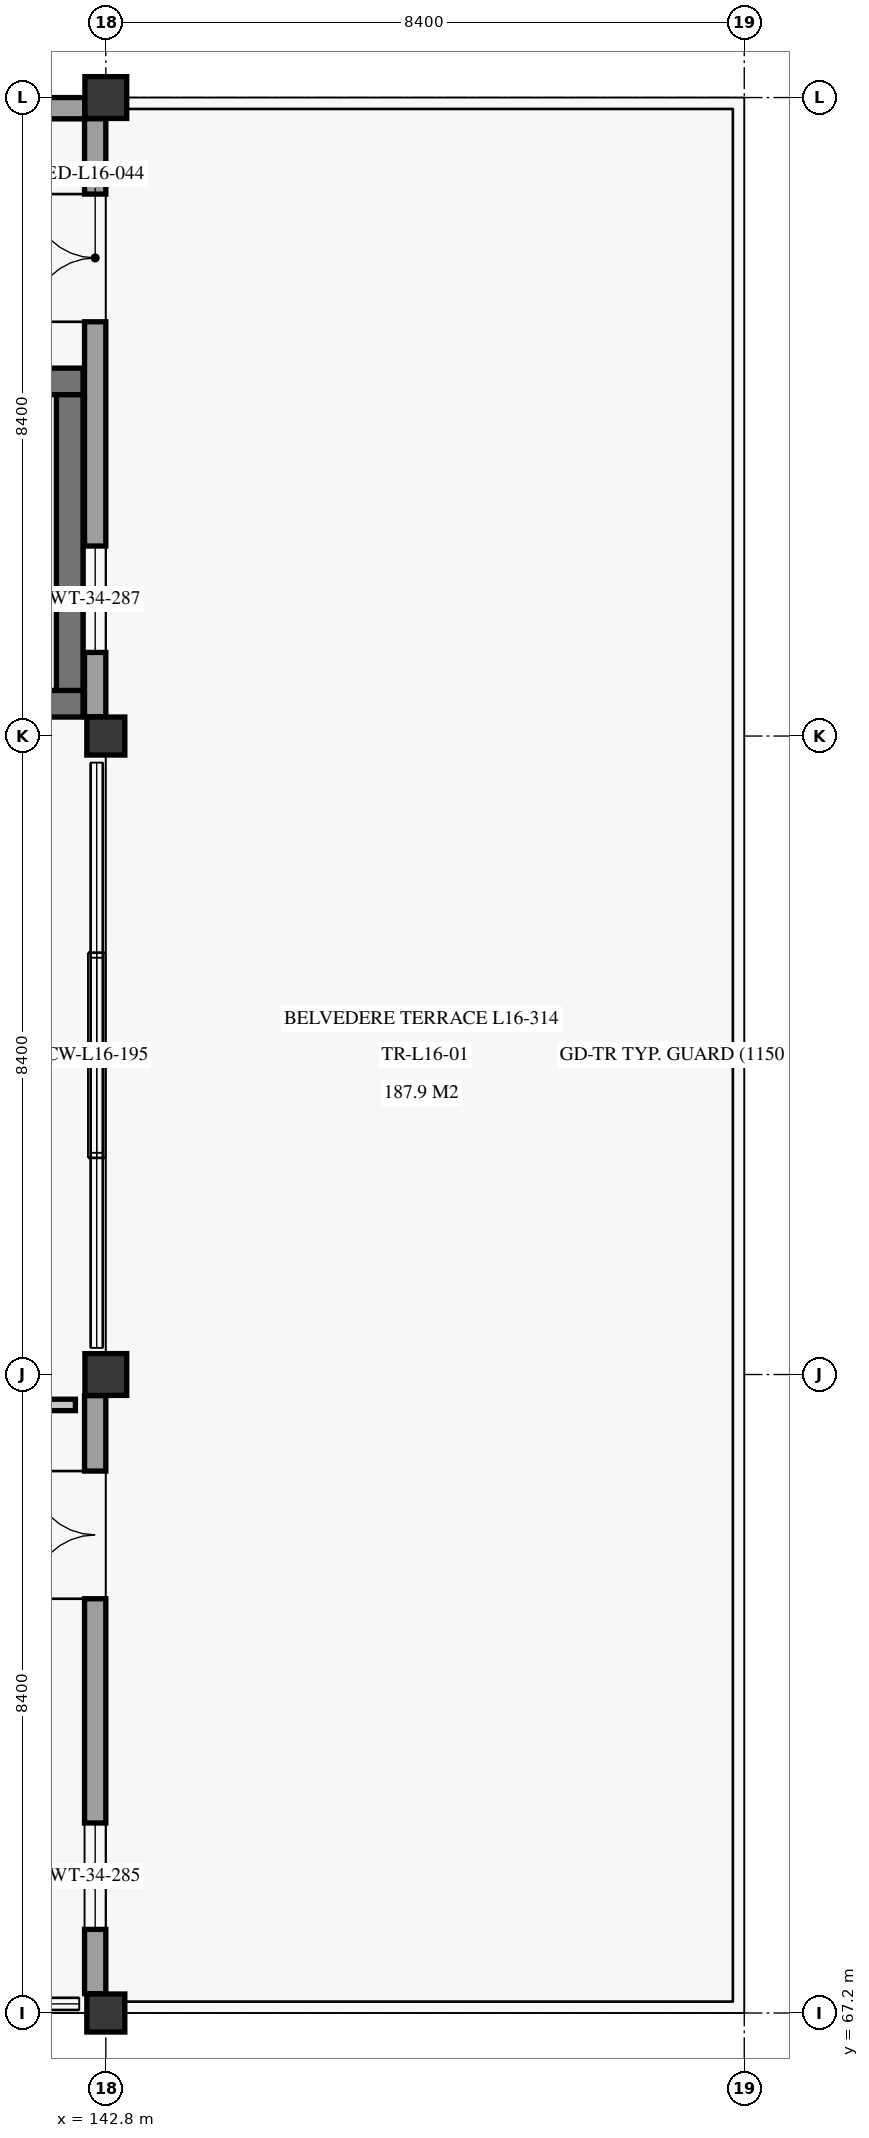
"""IFC4 building model, lengths in metres.
Left out: names, types, materials, properties, quantities, classifications, styles, units other than length and angle.
Written with IfcOpenShell. Run it as: python <this file> out.ifc"""

import sys

from ifc_helpers import new_model, si_unit, direction, frame, frame_2d, origin, origin_2d, place, context, subcontext, project, spatial, polyline, rectangle, outline, extrude, element, fill, save


model = new_model("IFC4")
c1 = context("Model", 3, precision=1e-05, world=origin(), true_north=direction((0.0, 1.0)))
c2 = subcontext(c1, "Body", "Model", "MODEL_VIEW")
j1 = project(units=[si_unit("LENGTHUNIT", "METRE"), si_unit("PLANEANGLEUNIT", "RADIAN")], contexts=[c1])
p1 = place(None, origin())
s1 = spatial("IfcSite", under=j1, at=p1, CompositionType="ELEMENT")
p2 = place(p1, origin())
s2 = spatial("IfcBuilding", under=s1, at=p2, CompositionType="ELEMENT")
p3 = place(p2, frame((0.0, 0.0, 66.7)))
s3 = spatial("IfcBuildingStorey", under=s2, at=p3, CompositionType="ELEMENT", Elevation=66.7)
p4 = place(p3, frame((142.8, 67.2, 0.0), z_axis=(0.0, 0.0, 1.0), x_axis=(1.0, 0.0, 0.0)))
e1 = element("IfcColumn", 1, at=p4, inside=s3, PredefinedType="COLUMN", context=c2, shape_type="SweptSolid", body=[
    extrude(rectangle(XDim=0.5, YDim=0.5, at=origin_2d()), origin(), (0.0, 0.0, 1.0), 4.22),
])
p5 = place(p3, frame((142.8, 75.6, 0.0), z_axis=(0.0, 0.0, 1.0), x_axis=(1.0, 0.0, 0.0)))
e2 = element("IfcColumn", 2, at=p5, inside=s3, PredefinedType="COLUMN", context=c2, shape_type="SweptSolid", body=[
    extrude(rectangle(XDim=0.55, YDim=0.55, at=origin_2d()), origin(), (0.0, 0.0, 1.0), 4.22),
])
p6 = place(p3, frame((142.8, 84.0, 0.0), z_axis=(0.0, 0.0, 1.0), x_axis=(1.0, 0.0, 0.0)))
e3 = element("IfcColumn", 3, at=p6, inside=s3, PredefinedType="COLUMN", context=c2, shape_type="SweptSolid", body=[
    extrude(rectangle(XDim=0.5, YDim=0.5, at=origin_2d()), origin(), (0.0, 0.0, 1.0), 4.22),
])
p7 = place(p3, frame((142.8, 92.4, 0.0), z_axis=(0.0, 0.0, 1.0), x_axis=(1.0, 0.0, 0.0)))
e4 = element("IfcColumn", 4, at=p7, inside=s3, PredefinedType="COLUMN", context=c2, shape_type="SweptSolid", body=[
    extrude(rectangle(XDim=0.55, YDim=0.55, at=origin_2d()), origin(), (0.0, 0.0, 1.0), 4.22),
])
p8 = place(p3, frame((134.654, 92.26, 0.0), z_axis=(0.0, 0.0, 1.0), x_axis=(1.0, 0.0, 0.0)))
e5 = element("IfcWall", 5, at=p8, inside=s3, PredefinedType="SOLIDWALL", context=c2, shape_type="SweptSolid", body=[
    extrude(rectangle(XDim=7.868, YDim=0.28, at=frame_2d((3.934, 0.0))), origin(), (0.0, 0.0, 1.0), 3.54),
])
p9 = place(p8, frame((2.546, 0.0, 0.85)))
e6 = element("IfcOpeningElement", 6, at=p9, cuts=e5, PredefinedType="OPENING", context=c2, shape_type="SweptSolid", body=[
    extrude(rectangle(XDim=2.8, YDim=1.85, at=frame_2d((1.4, 0.925))), frame((0.0, 0.15, 0.0), z_axis=(0.0, -1.0, 0.0), x_axis=(1.0, 0.0, 0.0)), (0.0, 0.0, 1.0), 0.3),
])
p10 = place(p3, frame((142.66, 67.454, 0.0), z_axis=(0.0, 0.0, 1.0), x_axis=(0.0, 1.0, 0.0)))
e7 = element("IfcWall", 7, at=p10, inside=s3, PredefinedType="SOLIDWALL", context=c2, shape_type="SweptSolid", body=[
    extrude(rectangle(XDim=7.868, YDim=0.28, at=frame_2d((3.934, 0.0))), origin(), (0.0, 0.0, 1.0), 3.54),
])
p11 = place(p10, frame((0.846, 0.0, 0.85)))
e8 = element("IfcOpeningElement", 8, at=p11, cuts=e7, PredefinedType="OPENING", context=c2, shape_type="SweptSolid", body=[
    extrude(rectangle(XDim=1.4, YDim=1.7, at=frame_2d((0.7, 0.85))), frame((0.0, 0.15, 0.0), z_axis=(0.0, -1.0, 0.0), x_axis=(1.0, 0.0, 0.0)), (0.0, 0.0, 1.0), 0.3),
])
p12 = place(p10, frame((5.196, 0.0, 0.0)))
e9 = element("IfcOpeningElement", 9, at=p12, cuts=e7, PredefinedType="OPENING", context=c2, shape_type="SweptSolid", body=[
    extrude(rectangle(XDim=1.68, YDim=2.3, at=frame_2d((0.84, 1.15))), frame((0.0, 0.15, 0.0), z_axis=(0.0, -1.0, 0.0), x_axis=(1.0, 0.0, 0.0)), (0.0, 0.0, 1.0), 0.3),
])
p13 = place(p3, frame((142.66, 84.254, 0.0), z_axis=(0.0, 0.0, 1.0), x_axis=(0.0, 1.0, 0.0)))
e10 = element("IfcWall", 10, at=p13, inside=s3, PredefinedType="SOLIDWALL", context=c2, shape_type="SweptSolid", body=[
    extrude(rectangle(XDim=7.868, YDim=0.28, at=frame_2d((3.934, 0.0))), origin(), (0.0, 0.0, 1.0), 3.54),
])
p14 = place(p13, frame((0.846, 0.0, 0.85)))
e11 = element("IfcOpeningElement", 11, at=p14, cuts=e10, PredefinedType="OPENING", context=c2, shape_type="SweptSolid", body=[
    extrude(rectangle(XDim=1.4, YDim=1.7, at=frame_2d((0.7, 0.85))), frame((0.0, 0.15, 0.0), z_axis=(0.0, -1.0, 0.0), x_axis=(1.0, 0.0, 0.0)), (0.0, 0.0, 1.0), 0.3),
])
p15 = place(p13, frame((5.196, 0.0, 0.0)))
e12 = element("IfcOpeningElement", 12, at=p15, cuts=e10, PredefinedType="OPENING", context=c2, shape_type="SweptSolid", body=[
    extrude(rectangle(XDim=1.68, YDim=2.3, at=frame_2d((0.84, 1.15))), frame((0.0, 0.15, 0.0), z_axis=(0.0, -1.0, 0.0), x_axis=(1.0, 0.0, 0.0)), (0.0, 0.0, 1.0), 0.3),
])
for number, where, z_axis, x_axis in (
    (13, (134.53, 92.28, 4.5), (0.0, 0.0, 1.0), (1.0, 0.0, 0.0)),
    (14, (134.53, 67.32, 4.5), (0.0, 0.0, 1.0), (1.0, 0.0, 0.0)),
):
    element("IfcWall", number, at=place(p3, frame(where, z_axis=z_axis, x_axis=x_axis)), inside=s3, PredefinedType="SOLIDWALL", context=c2, shape_type="SweptSolid", body=[
        extrude(outline(polyline([(0.0, 0.0), (8.104, 0.0), (8.104, 3.0), (4.052, 3.6), (0.0, 4.2), (0.0, 0.0)])), frame((0.0, 0.115, 0.0), z_axis=(0.0, -1.0, 0.0), x_axis=(1.0, 0.0, 0.0)), (0.0, 0.0, 1.0), 0.23),
    ])
p16 = place(p3, frame((142.68, 67.366, 4.5), z_axis=(0.0, 0.0, 1.0), x_axis=(0.0, 1.0, 0.0)))
e15 = element("IfcWall", 15, at=p16, inside=s3, PredefinedType="SOLIDWALL", context=c2, shape_type="SweptSolid", body=[
    extrude(rectangle(XDim=8.104, YDim=0.23, at=frame_2d((4.052, 0.0))), origin(), (0.0, 0.0, 1.0), 3.15),
])
p17 = place(p3, frame((142.68, 75.73, 4.5), z_axis=(0.0, 0.0, 1.0), x_axis=(0.0, 1.0, 0.0)))
e16 = element("IfcWall", 16, at=p17, inside=s3, PredefinedType="SOLIDWALL", context=c2, shape_type="SweptSolid", body=[
    extrude(rectangle(XDim=8.14, YDim=0.23, at=frame_2d((4.07, 0.0))), origin(), (0.0, 0.0, 1.0), 3.15),
])
p18 = place(p17, frame((2.72, 0.0, 0.5)))
e17 = element("IfcOpeningElement", 17, at=p18, cuts=e16, PredefinedType="OPENING", context=c2, shape_type="SweptSolid", body=[
    extrude(rectangle(XDim=2.7, YDim=2.2, at=frame_2d((1.35, 1.1))), frame((0.0, 0.125, 0.0), z_axis=(0.0, -1.0, 0.0), x_axis=(1.0, 0.0, 0.0)), (0.0, 0.0, 1.0), 0.25),
])
p19 = place(p3, frame((142.68, 84.13, 4.5), z_axis=(0.0, 0.0, 1.0), x_axis=(0.0, 1.0, 0.0)))
e18 = element("IfcWall", 18, at=p19, inside=s3, PredefinedType="SOLIDWALL", context=c2, shape_type="SweptSolid", body=[
    extrude(rectangle(XDim=8.104, YDim=0.23, at=frame_2d((4.052, 0.0))), origin(), (0.0, 0.0, 1.0), 3.15),
])
p20 = place(p3, frame((132.75, 84.425, 0.0), z_axis=(0.0, 0.0, 1.0), x_axis=(1.0, 0.0, 0.0)))
e19 = element("IfcWall", 19, at=p20, inside=s3, PredefinedType="SHEAR", context=c2, shape_type="SweptSolid", body=[
    extrude(rectangle(XDim=9.75, YDim=0.35, at=frame_2d((4.875, 0.0))), origin(), (0.0, 0.0, 1.0), 4.22),
])
p21 = place(p3, frame((132.75, 88.665, 0.0), z_axis=(0.0, 0.0, 1.0), x_axis=(1.0, 0.0, 0.0)))
e20 = element("IfcWall", 20, at=p21, inside=s3, PredefinedType="SHEAR", context=c2, shape_type="SweptSolid", body=[
    extrude(rectangle(XDim=9.75, YDim=0.35, at=frame_2d((4.875, 0.0))), origin(), (0.0, 0.0, 1.0), 4.22),
])
p22 = place(p21, frame((0.72, 0.0, 0.0)))
e21 = element("IfcOpeningElement", 21, at=p22, cuts=e20, PredefinedType="OPENING", context=c2, shape_type="SweptSolid", body=[
    extrude(rectangle(XDim=1.25, YDim=2.2, at=frame_2d((0.625, 1.1))), frame((0.0, 0.185, 0.0), z_axis=(0.0, -1.0, 0.0), x_axis=(1.0, 0.0, 0.0)), (0.0, 0.0, 1.0), 0.37),
])
p23 = place(p3, frame((142.325, 84.6, 0.0), z_axis=(0.0, 0.0, 1.0), x_axis=(0.0, 1.0, 0.0)))
e22 = element("IfcWall", 22, at=p23, inside=s3, PredefinedType="SHEAR", context=c2, shape_type="SweptSolid", body=[
    extrude(rectangle(XDim=3.89, YDim=0.35, at=frame_2d((1.945, 0.0))), origin(), (0.0, 0.0, 1.0), 4.22),
])
p24 = place(p3, frame((132.75, 84.425, 4.5), z_axis=(0.0, 0.0, 1.0), x_axis=(1.0, 0.0, 0.0)))
e23 = element("IfcWall", 23, at=p24, inside=s3, PredefinedType="SHEAR", context=c2, shape_type="SweptSolid", body=[
    extrude(rectangle(XDim=9.75, YDim=0.35, at=frame_2d((4.875, 0.0))), origin(), (0.0, 0.0, 1.0), 3.58),
])
p25 = place(p3, frame((132.75, 88.665, 4.5), z_axis=(0.0, 0.0, 1.0), x_axis=(1.0, 0.0, 0.0)))
e24 = element("IfcWall", 24, at=p25, inside=s3, PredefinedType="SHEAR", context=c2, shape_type="SweptSolid", body=[
    extrude(rectangle(XDim=9.75, YDim=0.35, at=frame_2d((4.875, 0.0))), origin(), (0.0, 0.0, 1.0), 3.58),
])
p26 = place(p25, frame((0.72, 0.0, 0.0)))
e25 = element("IfcOpeningElement", 25, at=p26, cuts=e24, PredefinedType="OPENING", context=c2, shape_type="SweptSolid", body=[
    extrude(rectangle(XDim=1.25, YDim=2.2, at=frame_2d((0.625, 1.1))), frame((0.0, 0.185, 0.0), z_axis=(0.0, -1.0, 0.0), x_axis=(1.0, 0.0, 0.0)), (0.0, 0.0, 1.0), 0.37),
])
p27 = place(p3, frame((142.325, 84.6, 4.5), z_axis=(0.0, 0.0, 1.0), x_axis=(0.0, 1.0, 0.0)))
e26 = element("IfcWall", 26, at=p27, inside=s3, PredefinedType="SHEAR", context=c2, shape_type="SweptSolid", body=[
    extrude(rectangle(XDim=3.89, YDim=0.35, at=frame_2d((1.945, 0.0))), origin(), (0.0, 0.0, 1.0), 3.58),
])
p28 = place(p3, frame((135.6, 75.2, 0.0), z_axis=(0.0, 0.0, 1.0), x_axis=(1.0, 0.0, 0.0)))
e27 = element("IfcWall", 27, at=p28, inside=s3, PredefinedType="PARTITIONING", context=c2, shape_type="SweptSolid", body=[
    extrude(rectangle(XDim=6.8, YDim=0.15, at=frame_2d((3.4, 0.0))), origin(), (0.0, 0.0, 1.0), 3.84),
])
p29 = place(p11, origin())
e28 = element("IfcWindow", 28, at=p29, inside=s3, PartitioningType="SINGLE_PANEL", PredefinedType="WINDOW", context=c2, shape_type="SweptSolid", body=[
    extrude(rectangle(XDim=1.4, YDim=1.7, at=frame_2d((0.7, 0.85))), frame((0.0, 0.03, 0.0), z_axis=(0.0, -1.0, 0.0), x_axis=(1.0, 0.0, 0.0)), (0.0, 0.0, 1.0), 0.06),
])
fill(e8, e28)
p30 = place(p12, origin())
e29 = element("IfcDoor", 29, at=p30, inside=s3, OperationType="DOUBLE_DOOR_SINGLE_SWING", PredefinedType="DOOR", context=c2, shape_type="SweptSolid", body=[
    extrude(rectangle(XDim=1.68, YDim=2.3, at=frame_2d((0.84, 1.15))), frame((0.0, 0.025, 0.0), z_axis=(0.0, -1.0, 0.0), x_axis=(1.0, 0.0, 0.0)), (0.0, 0.0, 1.0), 0.05),
])
fill(e9, e29)
p31 = place(p14, origin())
e30 = element("IfcWindow", 30, at=p31, inside=s3, PartitioningType="SINGLE_PANEL", PredefinedType="WINDOW", context=c2, shape_type="SweptSolid", body=[
    extrude(rectangle(XDim=1.4, YDim=1.7, at=frame_2d((0.7, 0.85))), frame((0.0, 0.03, 0.0), z_axis=(0.0, -1.0, 0.0), x_axis=(1.0, 0.0, 0.0)), (0.0, 0.0, 1.0), 0.06),
])
fill(e11, e30)
p32 = place(p15, origin())
e31 = element("IfcDoor", 31, at=p32, inside=s3, OperationType="DOUBLE_DOOR_SINGLE_SWING", PredefinedType="DOOR", context=c2, shape_type="SweptSolid", body=[
    extrude(rectangle(XDim=1.68, YDim=2.3, at=frame_2d((0.84, 1.15))), frame((0.0, 0.025, 0.0), z_axis=(0.0, -1.0, 0.0), x_axis=(1.0, 0.0, 0.0)), (0.0, 0.0, 1.0), 0.05),
])
fill(e12, e31)
p33 = place(p18, origin())
e32 = element("IfcWindow", 32, at=p33, inside=s3, PartitioningType="SINGLE_PANEL", PredefinedType="WINDOW", context=c2, shape_type="SweptSolid", body=[
    extrude(rectangle(XDim=2.7, YDim=2.2, at=frame_2d((1.35, 1.1))), frame((0.0, 0.03, 0.0), z_axis=(0.0, -1.0, 0.0), x_axis=(1.0, 0.0, 0.0)), (0.0, 0.0, 1.0), 0.06),
])
fill(e17, e32)
save(model, sys.argv[1])
